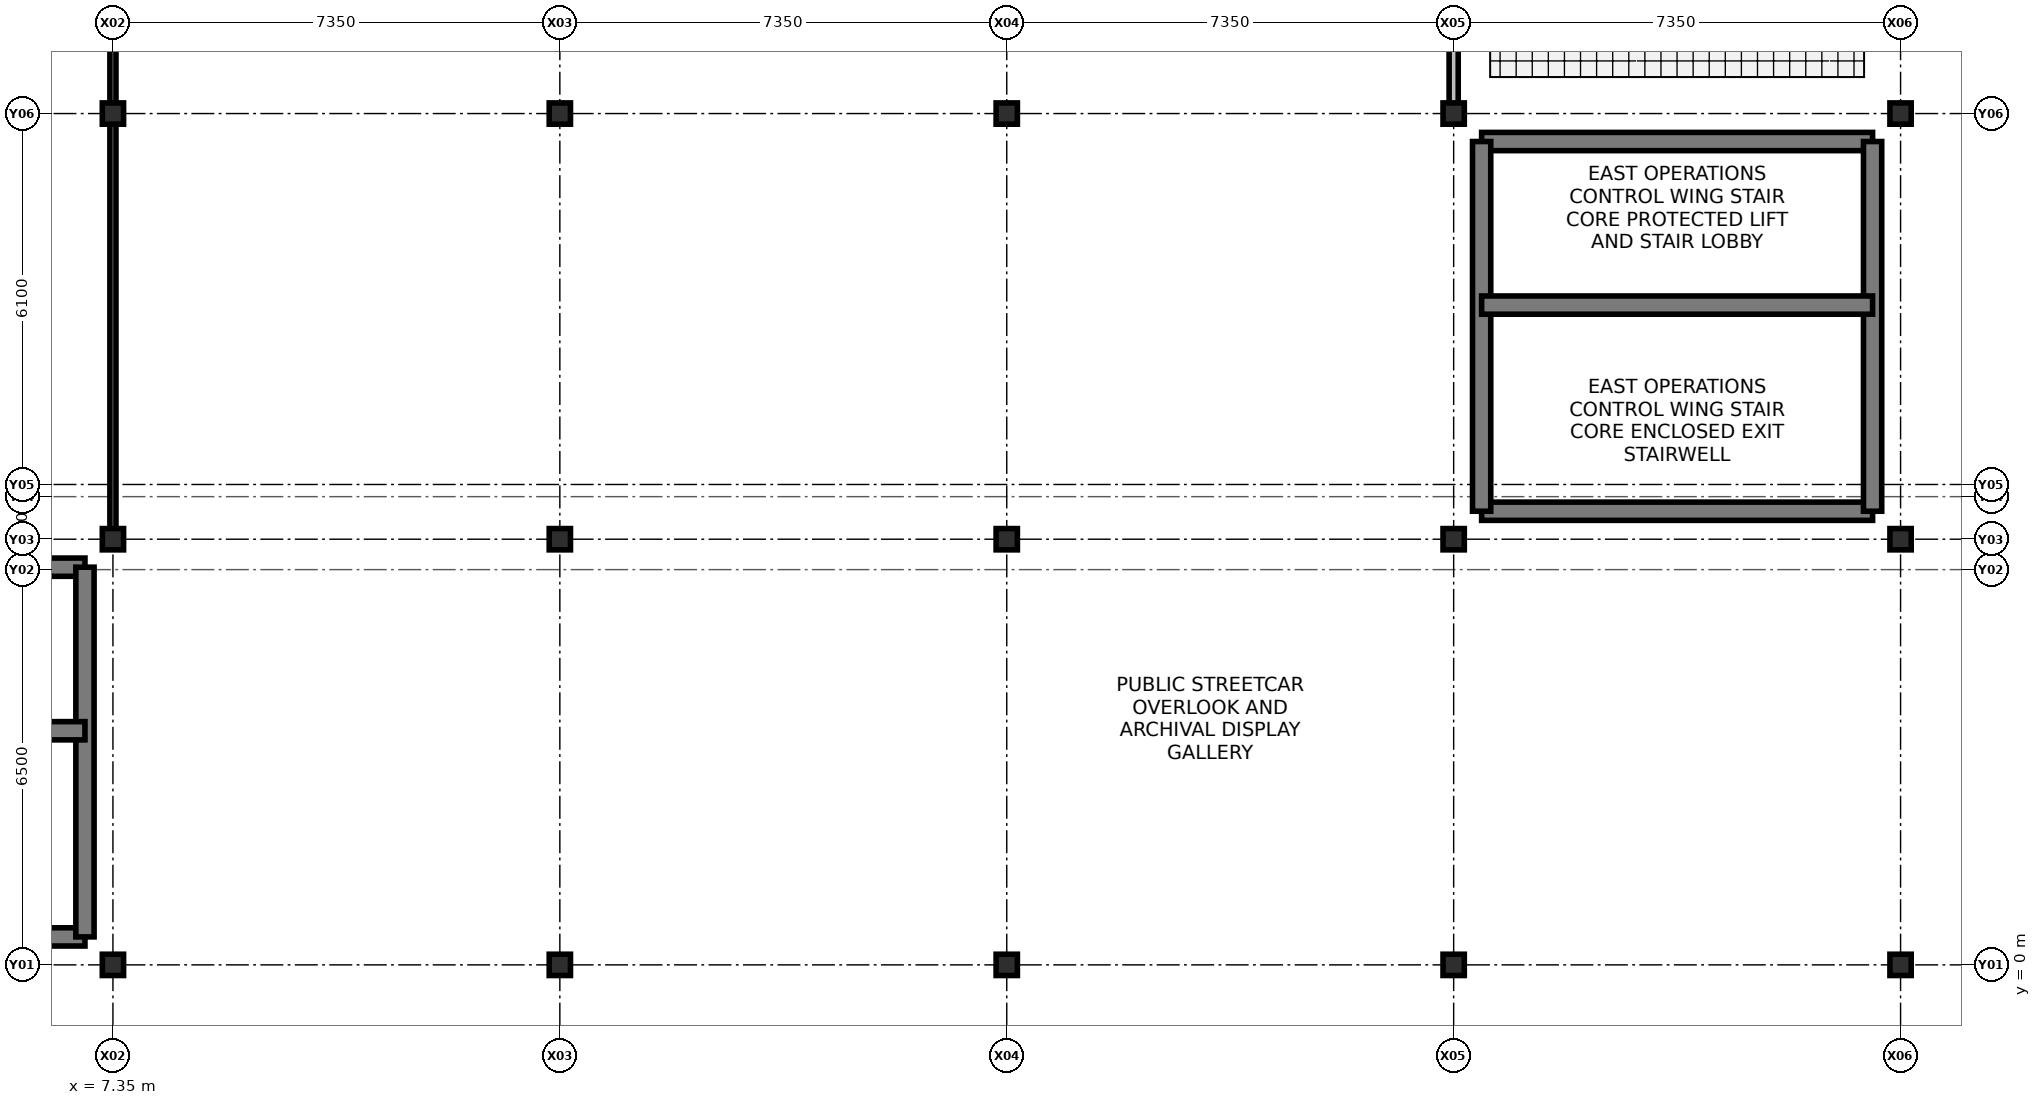
"""IFC4 building model, lengths in metres.
Left out: names, types, materials, properties, quantities, classifications, styles, units other than length and angle.
Written with IfcOpenShell. Run it as: python <this file> out.ifc"""

import sys

from ifc_helpers import new_model, si_unit, direction, frame, frame_2d, origin, origin_2d, place, context, subcontext, project, spatial, rectangle, i_section, extrude, element, fill, save


model = new_model("IFC4")
c1 = context("Model", 3, precision=1e-05, world=origin(), true_north=direction((0.0, 1.0)))
c2 = subcontext(c1, "Body", "Model", "MODEL_VIEW")
j1 = project(units=[si_unit("LENGTHUNIT", "METRE"), si_unit("PLANEANGLEUNIT", "RADIAN")], contexts=[c1])
p1 = place(None, origin())
s1 = spatial("IfcSite", under=j1, at=p1, CompositionType="ELEMENT")
p2 = place(p1, origin())
s2 = spatial("IfcBuilding", under=s1, at=p2, CompositionType="ELEMENT")
p3 = place(p2, frame((0.0, 0.0, 6.0)))
s3 = spatial("IfcBuildingStorey", under=s2, at=p3, CompositionType="ELEMENT", Elevation=6.0)
for number, where, z_axis, x_axis in (
    (1, (7.35, 0.0, 0.0), (0.0, 0.0, 1.0), (1.0, 0.0, 0.0)),
    (2, (7.35, 7.0, 0.0), (0.0, 0.0, 1.0), (1.0, 0.0, 0.0)),
    (3, (7.35, 14.0, 0.0), (0.0, 0.0, 1.0), (1.0, 0.0, 0.0)),
    (4, (14.7, 0.0, 0.0), (0.0, 0.0, 1.0), (1.0, 0.0, 0.0)),
    (5, (14.7, 7.0, 0.0), (0.0, 0.0, 1.0), (1.0, 0.0, 0.0)),
    (6, (14.7, 14.0, 0.0), (0.0, 0.0, 1.0), (1.0, 0.0, 0.0)),
    (7, (22.05, 0.0, 0.0), (0.0, 0.0, 1.0), (1.0, 0.0, 0.0)),
    (8, (22.05, 7.0, 0.0), (0.0, 0.0, 1.0), (1.0, 0.0, 0.0)),
    (9, (22.05, 14.0, 0.0), (0.0, 0.0, 1.0), (1.0, 0.0, 0.0)),
    (10, (29.4, 0.0, 0.0), (0.0, 0.0, 1.0), (1.0, 0.0, 0.0)),
    (11, (29.4, 7.0, 0.0), (0.0, 0.0, 1.0), (1.0, 0.0, 0.0)),
    (12, (29.4, 14.0, 0.0), (0.0, 0.0, 1.0), (1.0, 0.0, 0.0)),
    (13, (36.75, 0.0, 0.0), (0.0, 0.0, 1.0), (1.0, 0.0, 0.0)),
    (14, (36.75, 7.0, 0.0), (0.0, 0.0, 1.0), (1.0, 0.0, 0.0)),
    (15, (36.75, 14.0, 0.0), (0.0, 0.0, 1.0), (1.0, 0.0, 0.0)),
):
    element("IfcColumn", number, at=place(p3, frame(where, z_axis=z_axis, x_axis=x_axis)), inside=s3, PredefinedType="COLUMN", context=c2, shape_type="SweptSolid", body=[
        extrude(i_section(OverallWidth=0.35, OverallDepth=0.35, WebThickness=0.012, FlangeThickness=0.019, at=origin_2d()), origin(), (0.0, 0.0, 1.0), 5.1),
    ])
p4 = place(p3, frame((29.86, 7.46, 0.0), z_axis=(0.0, 0.0, 1.0), x_axis=(1.0, 0.0, 0.0)))
e16 = element("IfcWall", 16, at=p4, inside=s3, PredefinedType="SHEAR", context=c2, shape_type="SweptSolid", body=[
    extrude(rectangle(XDim=6.43, YDim=0.3, at=frame_2d((3.215, 0.0))), origin(), (0.0, 0.0, 1.0), 4.82),
])
p5 = place(p3, frame((29.86, 13.54, 0.0), z_axis=(0.0, 0.0, 1.0), x_axis=(1.0, 0.0, 0.0)))
e17 = element("IfcWall", 17, at=p5, inside=s3, PredefinedType="SHEAR", context=c2, shape_type="SweptSolid", body=[
    extrude(rectangle(XDim=6.43, YDim=0.3, at=frame_2d((3.215, 0.0))), origin(), (0.0, 0.0, 1.0), 4.82),
])
p6 = place(p5, frame((0.55, 0.0, 0.0)))
e18 = element("IfcOpeningElement", 18, at=p6, cuts=e17, PredefinedType="OPENING", context=c2, shape_type="SweptSolid", body=[
    extrude(rectangle(XDim=1.5, YDim=2.2, at=frame_2d((0.75, 1.1))), frame((0.0, 0.16, 0.0), z_axis=(0.0, -1.0, 0.0), x_axis=(1.0, 0.0, 0.0)), (0.0, 0.0, 1.0), 0.32),
])
for number, where, z_axis, x_axis in (
    (19, (29.86, 7.46, 0.0), (0.0, 0.0, 1.0), (0.0, 1.0, 0.0)),
    (20, (36.29, 7.46, 0.0), (0.0, 0.0, 1.0), (0.0, 1.0, 0.0)),
):
    element("IfcWall", number, at=place(p3, frame(where, z_axis=z_axis, x_axis=x_axis)), inside=s3, PredefinedType="SHEAR", context=c2, shape_type="SweptSolid", body=[
        extrude(rectangle(XDim=6.08, YDim=0.3, at=frame_2d((3.04, 0.0))), origin(), (0.0, 0.0, 1.0), 4.82),
    ])
p7 = place(p3, frame((29.86, 10.85, 0.0), z_axis=(0.0, 0.0, 1.0), x_axis=(1.0, 0.0, 0.0)))
e21 = element("IfcWall", 21, at=p7, inside=s3, PredefinedType="SHEAR", context=c2, shape_type="SweptSolid", body=[
    extrude(rectangle(XDim=6.43, YDim=0.3, at=frame_2d((3.215, 0.0))), origin(), (0.0, 0.0, 1.0), 4.82),
])
p8 = place(p7, frame((0.185, 0.0, 0.0)))
e22 = element("IfcOpeningElement", 22, at=p8, cuts=e21, PredefinedType="OPENING", context=c2, shape_type="SweptSolid", body=[
    extrude(rectangle(XDim=1.05, YDim=2.15, at=frame_2d((0.525, 1.075))), frame((0.0, 0.16, 0.0), z_axis=(0.0, -1.0, 0.0), x_axis=(1.0, 0.0, 0.0)), (0.0, 0.0, 1.0), 0.32),
])
p9 = place(p3, frame((0.46, 0.46, 0.0), z_axis=(0.0, 0.0, 1.0), x_axis=(1.0, 0.0, 0.0)))
e23 = element("IfcWall", 23, at=p9, inside=s3, PredefinedType="SHEAR", context=c2, shape_type="SweptSolid", body=[
    extrude(rectangle(XDim=6.43, YDim=0.3, at=frame_2d((3.215, 0.0))), origin(), (0.0, 0.0, 1.0), 4.82),
])
p10 = place(p3, frame((0.46, 6.54, 0.0), z_axis=(0.0, 0.0, 1.0), x_axis=(1.0, 0.0, 0.0)))
e24 = element("IfcWall", 24, at=p10, inside=s3, PredefinedType="SHEAR", context=c2, shape_type="SweptSolid", body=[
    extrude(rectangle(XDim=6.43, YDim=0.3, at=frame_2d((3.215, 0.0))), origin(), (0.0, 0.0, 1.0), 4.82),
])
p11 = place(p10, frame((0.55, 0.0, 0.0)))
e25 = element("IfcOpeningElement", 25, at=p11, cuts=e24, PredefinedType="OPENING", context=c2, shape_type="SweptSolid", body=[
    extrude(rectangle(XDim=1.5, YDim=2.2, at=frame_2d((0.75, 1.1))), frame((0.0, 0.16, 0.0), z_axis=(0.0, -1.0, 0.0), x_axis=(1.0, 0.0, 0.0)), (0.0, 0.0, 1.0), 0.32),
])
p12 = place(p3, frame((6.89, 0.46, 0.0), z_axis=(0.0, 0.0, 1.0), x_axis=(0.0, 1.0, 0.0)))
e26 = element("IfcWall", 26, at=p12, inside=s3, PredefinedType="SHEAR", context=c2, shape_type="SweptSolid", body=[
    extrude(rectangle(XDim=6.08, YDim=0.3, at=frame_2d((3.04, 0.0))), origin(), (0.0, 0.0, 1.0), 4.82),
])
p13 = place(p3, frame((0.46, 3.85, 0.0), z_axis=(0.0, 0.0, 1.0), x_axis=(1.0, 0.0, 0.0)))
e27 = element("IfcWall", 27, at=p13, inside=s3, PredefinedType="SHEAR", context=c2, shape_type="SweptSolid", body=[
    extrude(rectangle(XDim=6.43, YDim=0.3, at=frame_2d((3.215, 0.0))), origin(), (0.0, 0.0, 1.0), 4.82),
])
p14 = place(p13, frame((0.185, 0.0, 0.0)))
e28 = element("IfcOpeningElement", 28, at=p14, cuts=e27, PredefinedType="OPENING", context=c2, shape_type="SweptSolid", body=[
    extrude(rectangle(XDim=1.05, YDim=2.15, at=frame_2d((0.525, 1.075))), frame((0.0, 0.16, 0.0), z_axis=(0.0, -1.0, 0.0), x_axis=(1.0, 0.0, 0.0)), (0.0, 0.0, 1.0), 0.32),
])
p15 = place(p3, frame((29.4, 14.0, 0.0), z_axis=(0.0, 0.0, 1.0), x_axis=(0.0, 1.0, 0.0)))
e29 = element("IfcWall", 29, at=p15, inside=s3, PredefinedType="PARTITIONING", context=c2, shape_type="SweptSolid", body=[
    extrude(rectangle(XDim=49.0, YDim=0.15, at=frame_2d((24.5, 0.0))), origin(), (0.0, 0.0, 1.0), 4.05),
])
p16 = place(p15, frame((10.0, 0.0, 0.0)))
e30 = element("IfcOpeningElement", 30, at=p16, cuts=e29, PredefinedType="OPENING", context=c2, shape_type="SweptSolid", body=[
    extrude(rectangle(XDim=1.4, YDim=2.2, at=frame_2d((0.7, 1.1))), frame((0.0, 0.085, 0.0), z_axis=(0.0, -1.0, 0.0), x_axis=(1.0, 0.0, 0.0)), (0.0, 0.0, 1.0), 0.17),
])
p17 = place(p15, frame((31.0, 0.0, 0.0)))
e31 = element("IfcOpeningElement", 31, at=p17, cuts=e29, PredefinedType="OPENING", context=c2, shape_type="SweptSolid", body=[
    extrude(rectangle(XDim=1.25, YDim=2.15, at=frame_2d((0.625, 1.075))), frame((0.0, 0.085, 0.0), z_axis=(0.0, -1.0, 0.0), x_axis=(1.0, 0.0, 0.0)), (0.0, 0.0, 1.0), 0.17),
])
p18 = place(p3, frame((7.35, 7.0, 0.0), z_axis=(0.0, 0.0, 1.0), x_axis=(0.0, 1.0, 0.0)))
e32 = element("IfcWall", 32, at=p18, inside=s3, PredefinedType="PARTITIONING", context=c2, shape_type="SweptSolid", body=[
    extrude(rectangle(XDim=21.0, YDim=0.1, at=frame_2d((10.5, 0.0))), origin(), (0.0, 0.0, 1.0), 4.05),
])
p19 = place(p18, frame((3.2, 0.0, 0.0)))
e33 = element("IfcOpeningElement", 33, at=p19, cuts=e32, PredefinedType="OPENING", context=c2, shape_type="SweptSolid", body=[
    extrude(rectangle(XDim=1.1, YDim=2.1, at=frame_2d((0.55, 1.05))), frame((0.0, 0.06, 0.0), z_axis=(0.0, -1.0, 0.0), x_axis=(1.0, 0.0, 0.0)), (0.0, 0.0, 1.0), 0.12),
])
p20 = place(p8, origin())
e34 = element("IfcDoor", 34, at=p20, inside=s3, OperationType="SINGLE_SWING_RIGHT", PredefinedType="DOOR", context=c2, shape_type="SweptSolid", body=[
    extrude(rectangle(XDim=1.05, YDim=2.15, at=frame_2d((0.525, 1.075))), frame((0.0, 0.025, 0.0), z_axis=(0.0, -1.0, 0.0), x_axis=(1.0, 0.0, 0.0)), (0.0, 0.0, 1.0), 0.05),
])
fill(e22, e34)
p21 = place(p6, origin())
e35 = element("IfcDoor", 35, at=p21, inside=s3, OperationType="DOUBLE_DOOR_SINGLE_SWING", PredefinedType="DOOR", context=c2, shape_type="SweptSolid", body=[
    extrude(rectangle(XDim=1.5, YDim=2.2, at=frame_2d((0.75, 1.1))), frame((0.0, 0.025, 0.0), z_axis=(0.0, -1.0, 0.0), x_axis=(1.0, 0.0, 0.0)), (0.0, 0.0, 1.0), 0.05),
])
fill(e18, e35)
p22 = place(p19, origin())
e36 = element("IfcDoor", 36, at=p22, inside=s3, OperationType="SINGLE_SWING_RIGHT", PredefinedType="DOOR", context=c2, shape_type="SweptSolid", body=[
    extrude(rectangle(XDim=1.1, YDim=2.1, at=frame_2d((0.55, 1.05))), frame((0.0, 0.025, 0.0), z_axis=(0.0, -1.0, 0.0), x_axis=(1.0, 0.0, 0.0)), (0.0, 0.0, 1.0), 0.05),
])
fill(e33, e36)
save(model, sys.argv[1])
